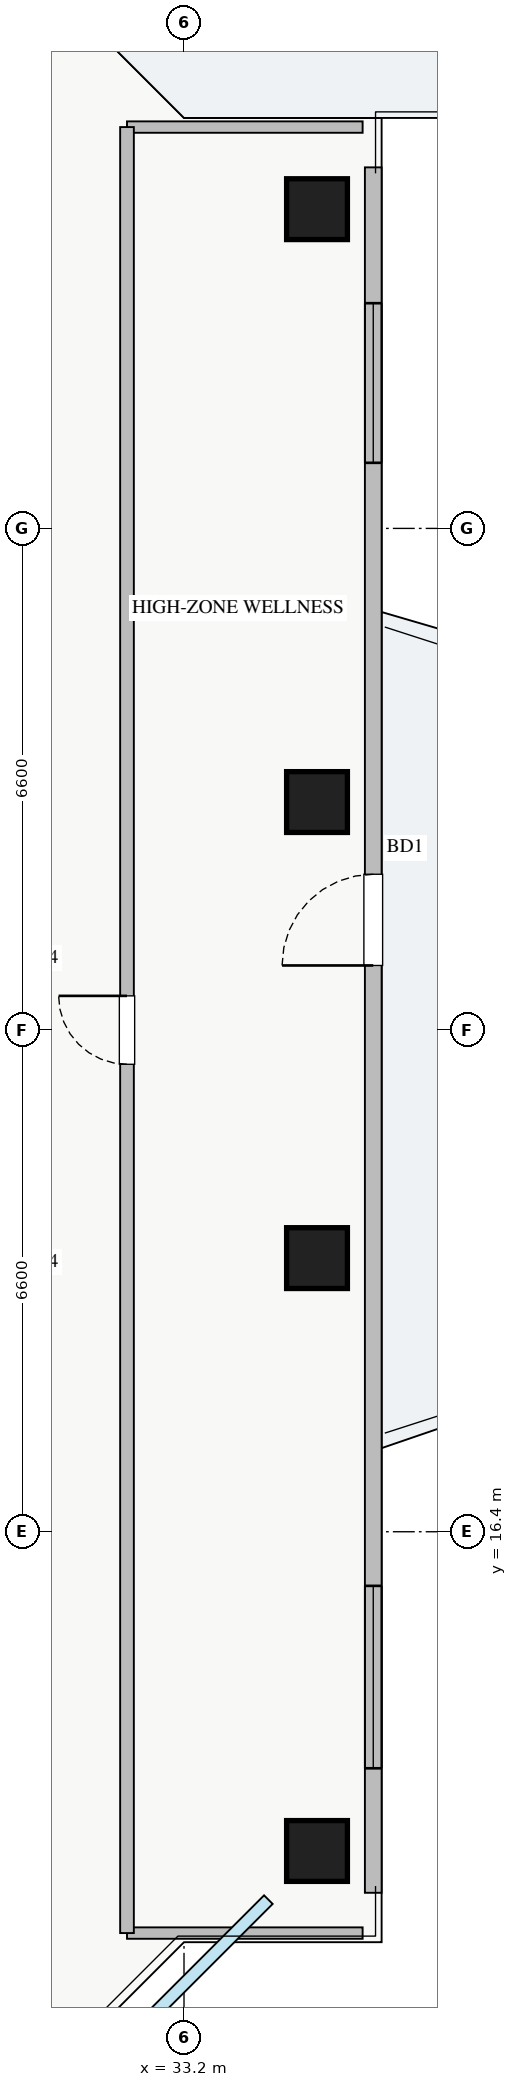
"""IFC4 building model, lengths in metres.
Left out: names, types, materials, properties, quantities, classifications, styles, units other than length and angle.
Written with IfcOpenShell. Run it as: python <this file> out.ifc"""

import sys

from ifc_helpers import new_model, si_unit, direction, frame, frame_2d, origin, origin_2d, place, context, subcontext, project, spatial, rectangle, extrude, source, transform, mapped, element, fill, save


model = new_model("IFC4")
c1 = context("Model", 3, precision=1e-05, world=origin(), true_north=direction((0.0, 1.0)))
c2 = subcontext(c1, "Body", "Model", "MODEL_VIEW")
j1 = project(units=[si_unit("LENGTHUNIT", "METRE"), si_unit("PLANEANGLEUNIT", "RADIAN")], contexts=[c1])
p1 = place(None, origin())
s1 = spatial("IfcSite", under=j1, at=p1, CompositionType="ELEMENT")
p2 = place(p1, origin())
s2 = spatial("IfcBuilding", under=s1, at=p2, CompositionType="ELEMENT")
p3 = place(p2, frame((0.0, 0.0, 223.0)))
s3 = spatial("IfcBuildingStorey", under=s2, at=p3, CompositionType="ELEMENT", Elevation=223.0)
m1 = source(origin(), c2, "Body", "SweptSolid", [
    extrude(rectangle(XDim=0.8, YDim=0.8, at=origin_2d()), origin(), (0.0, 0.0, 1.0), 3.25),
])
for number, where, z_axis, x_axis in (
    (1, (34.95, 12.2, 0.0), (0.0, 0.0, 1.0), (1.0, 0.0, 0.0)),
    (2, (34.95, 20.0, 0.0), (0.0, 0.0, 1.0), (1.0, 0.0, 0.0)),
    (3, (34.95, 26.0, 0.0), (0.0, 0.0, 1.0), (1.0, 0.0, 0.0)),
    (4, (34.95, 33.8, 0.0), (0.0, 0.0, 1.0), (1.0, 0.0, 0.0)),
):
    element("IfcColumn", number, at=place(p3, frame(where, z_axis=z_axis, x_axis=x_axis)), inside=s3, PredefinedType="COLUMN", context=c2, shape_type="MappedRepresentation", body=[
        mapped(m1, transform((0.0, 0.0, 0.0), x_axis=(1.0, 0.0, 0.0), y_axis=(0.0, 1.0, 0.0), z_axis=(0.0, 0.0, 1.0), scale=1.0)),
    ])
p4 = place(p3, frame((35.69, 11.65, 0.0), z_axis=(0.0, 0.0, 1.0), x_axis=(0.0, 1.0, 0.0)))
e5 = element("IfcWall", 5, at=p4, inside=s3, PredefinedType="STANDARD", context=c2, shape_type="SweptSolid", body=[
    extrude(rectangle(XDim=22.7, YDim=0.22, at=frame_2d((11.35, 0.0))), origin(), (0.0, 0.0, 1.0), 2.61),
])
p5 = place(p4, frame((12.2, 0.0, 0.0)))
e6 = element("IfcOpeningElement", 6, at=p5, cuts=e5, PredefinedType="OPENING", context=c2, shape_type="SweptSolid", body=[
    extrude(rectangle(XDim=1.2, YDim=2.1, at=frame_2d((0.6, 1.05))), frame((0.0, 0.12, 0.0), z_axis=(0.0, -1.0, 0.0), x_axis=(1.0, 0.0, 0.0)), (0.0, 0.0, 1.0), 0.24),
])
p6 = place(p4, frame((1.638, 0.0, 0.9)))
e7 = element("IfcOpeningElement", 7, at=p6, cuts=e5, PredefinedType="OPENING", context=c2, shape_type="SweptSolid", body=[
    extrude(rectangle(XDim=2.4, YDim=1.48, at=frame_2d((1.2, 0.74))), frame((0.0, 0.12, 0.0), z_axis=(0.0, -1.0, 0.0), x_axis=(1.0, 0.0, 0.0)), (0.0, 0.0, 1.0), 0.24),
])
p7 = place(p4, frame((18.813, 0.0, 0.9)))
e8 = element("IfcOpeningElement", 8, at=p7, cuts=e5, PredefinedType="OPENING", context=c2, shape_type="SweptSolid", body=[
    extrude(rectangle(XDim=2.1, YDim=1.48, at=frame_2d((1.05, 0.74))), frame((0.0, 0.12, 0.0), z_axis=(0.0, -1.0, 0.0), x_axis=(1.0, 0.0, 0.0)), (0.0, 0.0, 1.0), 0.24),
])
for number, where, z_axis, x_axis in (
    (9, (32.45, 34.88, 0.0), (0.0, 0.0, 1.0), (1.0, 0.0, 0.0)),
    (10, (32.45, 11.12, 0.0), (0.0, 0.0, 1.0), (1.0, 0.0, 0.0)),
):
    element("IfcWall", number, at=place(p3, frame(where, z_axis=z_axis, x_axis=x_axis)), inside=s3, PredefinedType="PARTITIONING", context=c2, shape_type="SweptSolid", body=[
        extrude(rectangle(XDim=3.1, YDim=0.15, at=frame_2d((1.55, 0.0))), origin(), (0.0, 0.0, 1.0), 3.07),
    ])
p8 = place(p3, frame((32.45, 11.12, 0.0), z_axis=(0.0, 0.0, 1.0), x_axis=(0.0, 1.0, 0.0)))
e11 = element("IfcWall", 11, at=p8, inside=s3, PredefinedType="PARTITIONING", context=c2, shape_type="SweptSolid", body=[
    extrude(rectangle(XDim=23.76, YDim=0.18, at=frame_2d((11.88, 0.0))), origin(), (0.0, 0.0, 1.0), 3.07),
])
p9 = place(p8, frame((11.43, 0.0, 0.0)))
e12 = element("IfcOpeningElement", 12, at=p9, cuts=e11, PredefinedType="OPENING", context=c2, shape_type="SweptSolid", body=[
    extrude(rectangle(XDim=0.9, YDim=2.05, at=frame_2d((0.45, 1.025))), frame((0.0, 0.1, 0.0), z_axis=(0.0, -1.0, 0.0), x_axis=(1.0, 0.0, 0.0)), (0.0, 0.0, 1.0), 0.2),
])
m2 = source(origin(), c2, "Body", "SweptSolid", [
    extrude(rectangle(XDim=1.2, YDim=2.1, at=frame_2d((0.6, 1.05))), frame((0.0, 0.025, 0.0), z_axis=(0.0, -1.0, 0.0), x_axis=(1.0, 0.0, 0.0)), (0.0, 0.0, 1.0), 0.05),
])
p10 = place(p5, origin())
e13 = element("IfcDoor", 13, at=p10, inside=s3, OperationType="SINGLE_SWING_LEFT", PredefinedType="DOOR", context=c2, shape_type="MappedRepresentation", body=[
    mapped(m2, transform((0.0, 0.0, 0.0), x_axis=(1.0, 0.0, 0.0), y_axis=(0.0, 1.0, 0.0), z_axis=(0.0, 0.0, 1.0), scale=1.0)),
])
fill(e6, e13)
m3 = source(origin(), c2, "Body", "SweptSolid", [
    extrude(rectangle(XDim=2.4, YDim=1.48, at=frame_2d((1.2, 0.74))), frame((0.0, 0.03, 0.0), z_axis=(0.0, -1.0, 0.0), x_axis=(1.0, 0.0, 0.0)), (0.0, 0.0, 1.0), 0.06),
])
p11 = place(p6, origin())
e14 = element("IfcWindow", 14, at=p11, inside=s3, PartitioningType="TRIPLE_PANEL_VERTICAL", PredefinedType="WINDOW", context=c2, shape_type="MappedRepresentation", body=[
    mapped(m3, transform((0.0, 0.0, 0.0), x_axis=(1.0, 0.0, 0.0), y_axis=(0.0, 1.0, 0.0), z_axis=(0.0, 0.0, 1.0), scale=1.0)),
])
fill(e7, e14)
m4 = source(origin(), c2, "Body", "SweptSolid", [
    extrude(rectangle(XDim=2.1, YDim=1.48, at=frame_2d((1.05, 0.74))), frame((0.0, 0.03, 0.0), z_axis=(0.0, -1.0, 0.0), x_axis=(1.0, 0.0, 0.0)), (0.0, 0.0, 1.0), 0.06),
])
p12 = place(p7, origin())
e15 = element("IfcWindow", 15, at=p12, inside=s3, PartitioningType="TRIPLE_PANEL_VERTICAL", PredefinedType="WINDOW", context=c2, shape_type="MappedRepresentation", body=[
    mapped(m4, transform((0.0, 0.0, 0.0), x_axis=(1.0, 0.0, 0.0), y_axis=(0.0, 1.0, 0.0), z_axis=(0.0, 0.0, 1.0), scale=1.0)),
])
fill(e8, e15)
m5 = source(origin(), c2, "Body", "SweptSolid", [
    extrude(rectangle(XDim=0.9, YDim=2.05, at=frame_2d((0.45, 1.025))), frame((0.0, 0.025, 0.0), z_axis=(0.0, -1.0, 0.0), x_axis=(1.0, 0.0, 0.0)), (0.0, 0.0, 1.0), 0.05),
])
p13 = place(p9, origin())
e16 = element("IfcDoor", 16, at=p13, inside=s3, OperationType="SINGLE_SWING_RIGHT", PredefinedType="DOOR", context=c2, shape_type="MappedRepresentation", body=[
    mapped(m5, transform((0.0, 0.0, 0.0), x_axis=(1.0, 0.0, 0.0), y_axis=(0.0, 1.0, 0.0), z_axis=(0.0, 0.0, 1.0), scale=1.0)),
])
fill(e12, e16)
save(model, sys.argv[1])
